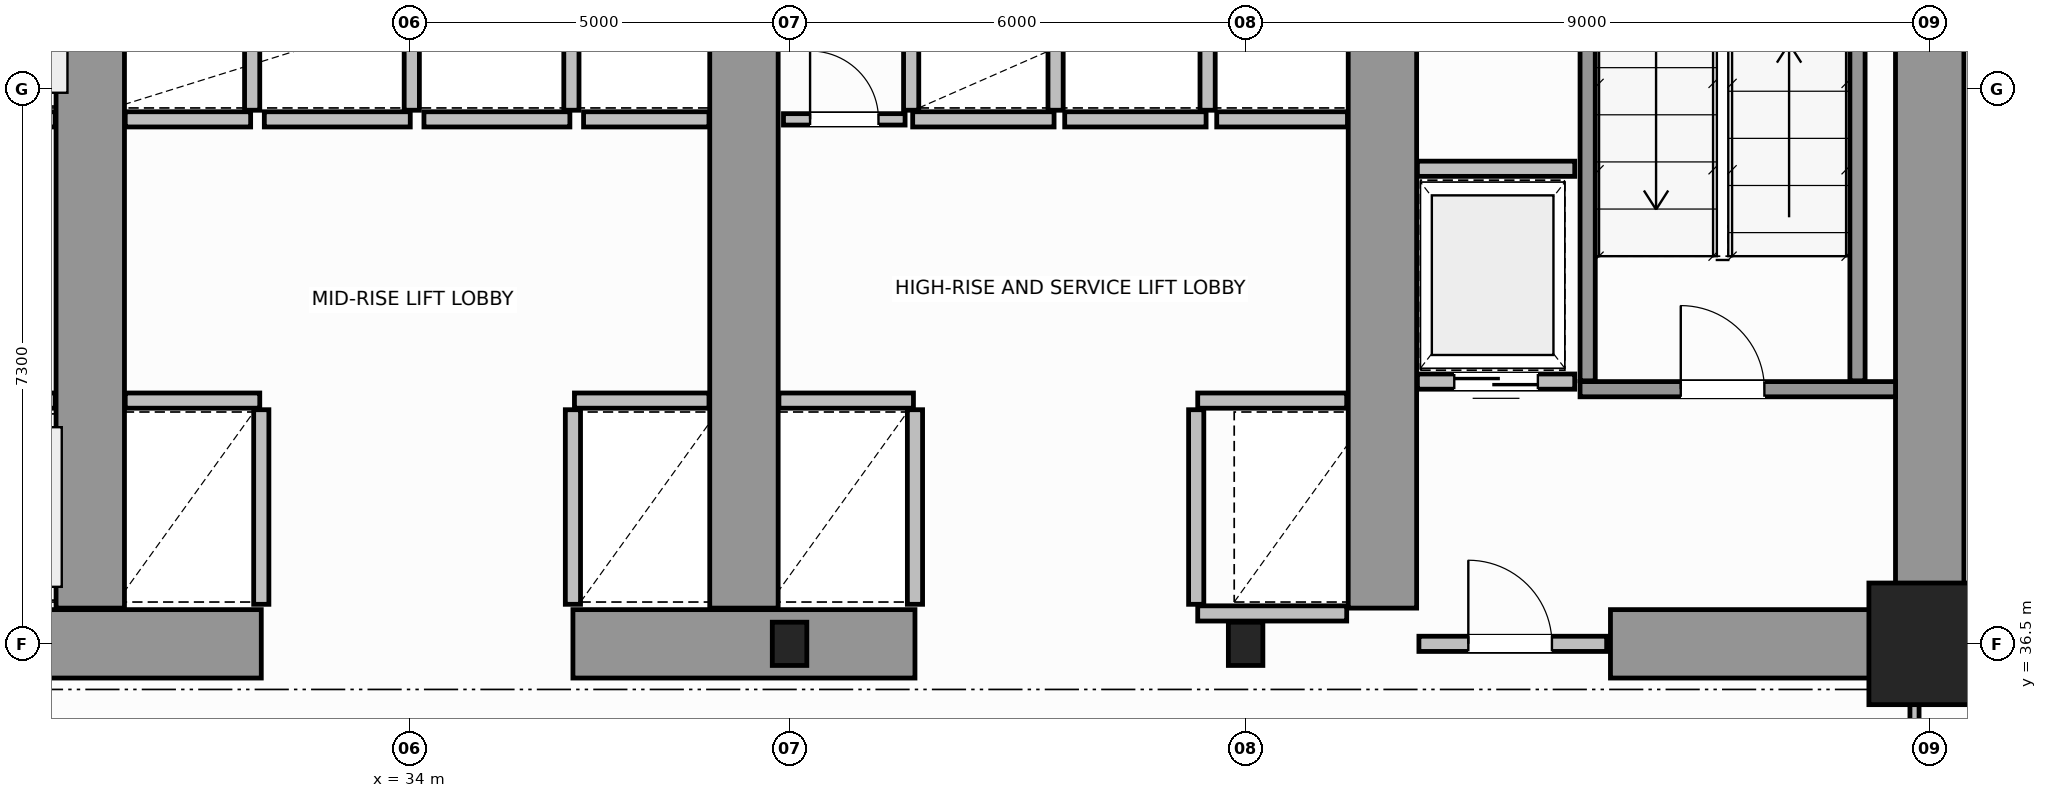
"""IFC4 building model, lengths in metres.
Left out: names, types, materials, properties, quantities, classifications, styles, units other than length and angle.
Written with IfcOpenShell. Run it as: python <this file> out.ifc"""

import sys

from ifc_helpers import new_model, si_unit, direction, frame, frame_2d, origin, origin_2d, place, context, subcontext, project, spatial, rectangle, i_section, extrude, source, transform, mapped, element, fill, save


model = new_model("IFC4")
c1 = context("Model", 3, precision=1e-05, world=origin(), true_north=direction((0.0, 1.0)))
c2 = subcontext(c1, "Body", "Model", "MODEL_VIEW")
j1 = project(units=[si_unit("LENGTHUNIT", "METRE"), si_unit("PLANEANGLEUNIT", "RADIAN")], contexts=[c1])
p1 = place(None, origin())
s1 = spatial("IfcSite", under=j1, at=p1, CompositionType="ELEMENT")
p2 = place(p1, origin())
s2 = spatial("IfcBuilding", under=s1, at=p2, CompositionType="ELEMENT")
p3 = place(p2, frame((0.0, 0.0, 49.2)))
s3 = spatial("IfcBuildingStorey", under=s2, at=p3, CompositionType="ELEMENT", Elevation=49.2)
m1 = source(origin(), c2, "Body", "SweptSolid", [
    extrude(i_section(OverallWidth=0.454, OverallDepth=0.569, WebThickness=0.078, FlangeThickness=0.08, FilletRadius=0.015, at=origin_2d()), origin(), (0.0, 0.0, 1.0), 3.8),
])
for number, where, z_axis, x_axis in (
    (1, (39.0, 36.5, 0.0), (0.0, 0.0, 1.0), (1.0, 0.0, 0.0)),
    (2, (45.0, 36.5, 0.0), (0.0, 0.0, 1.0), (1.0, 0.0, 0.0)),
):
    element("IfcColumn", number, at=place(p3, frame(where, z_axis=z_axis, x_axis=x_axis)), inside=s3, PredefinedType="COLUMN", context=c2, shape_type="MappedRepresentation", body=[
        mapped(m1, transform((0.0, 0.0, 0.0), scale=1.0)),
    ])
m2 = source(origin(), c2, "Body", "SweptSolid", [
    extrude(rectangle(XDim=1.6, YDim=1.6, at=origin_2d()), origin(), (0.0, 0.0, 1.0), 3.8),
])
p4 = place(p3, frame((54.0, 36.5, 0.0), z_axis=(0.0, 0.0, 1.0), x_axis=(1.0, 0.0, 0.0)))
e3 = element("IfcColumn", 3, at=p4, inside=s3, PredefinedType="COLUMN", context=c2, shape_type="MappedRepresentation", body=[
    mapped(m2, transform((0.0, 0.0, 0.0), scale=1.0)),
])
p5 = place(p3, frame((54.0, 36.5, 0.0), z_axis=(0.0, 0.0, 1.0), x_axis=(0.0, 1.0, 0.0)))
e4 = element("IfcWall", 4, at=p5, inside=s3, PredefinedType="SHEAR", context=c2, shape_type="SweptSolid", body=[
    extrude(rectangle(XDim=14.5, YDim=0.9, at=frame_2d((7.25, 0.0))), origin(), (0.0, 0.0, 1.0), 3.8),
])
for number, where, z_axis, x_axis in (
    (5, (27.55, 36.5, 0.0), (0.0, 0.0, 1.0), (1.0, 0.0, 0.0)),
    (6, (36.15, 36.5, 0.0), (0.0, 0.0, 1.0), (1.0, 0.0, 0.0)),
):
    element("IfcWall", number, at=place(p3, frame(where, z_axis=z_axis, x_axis=x_axis)), inside=s3, PredefinedType="SHEAR", context=c2, shape_type="SweptSolid", body=[
        extrude(rectangle(XDim=4.5, YDim=0.9, at=frame_2d((2.25, 0.0))), origin(), (0.0, 0.0, 1.0), 3.8),
    ])
p6 = place(p3, frame((49.8, 36.5, 0.0), z_axis=(0.0, 0.0, 1.0), x_axis=(1.0, 0.0, 0.0)))
e7 = element("IfcWall", 7, at=p6, inside=s3, PredefinedType="SHEAR", context=c2, shape_type="SweptSolid", body=[
    extrude(rectangle(XDim=3.73, YDim=0.9, at=frame_2d((1.865, 0.0))), origin(), (0.0, 0.0, 1.0), 2.38),
])
for number, where, z_axis, x_axis in (
    (8, (29.8, 36.97, 0.0), (0.0, 0.0, 1.0), (0.0, 1.0, 0.0)),
    (9, (38.4, 36.97, 0.0), (0.0, 0.0, 1.0), (0.0, 1.0, 0.0)),
    (10, (46.8, 36.97, 0.0), (0.0, 0.0, 1.0), (0.0, 1.0, 0.0)),
):
    element("IfcWall", number, at=place(p3, frame(where, z_axis=z_axis, x_axis=x_axis)), inside=s3, PredefinedType="SHEAR", context=c2, shape_type="SweptSolid", body=[
        extrude(rectangle(XDim=9.23, YDim=0.9, at=frame_2d((4.615, 0.0))), origin(), (0.0, 0.0, 1.0), 3.8),
    ])
p7 = place(p3, frame((49.4, 39.85, 0.0), z_axis=(0.0, 0.0, 1.0), x_axis=(1.0, 0.0, 0.0)))
e11 = element("IfcWall", 11, at=p7, inside=s3, PredefinedType="SOLIDWALL", context=c2, shape_type="SweptSolid", body=[
    extrude(rectangle(XDim=4.15, YDim=0.2, at=frame_2d((2.075, 0.0))), origin(), (0.0, 0.0, 1.0), 3.8),
])
p8 = place(p7, frame((1.325, 0.0, 0.0)))
e12 = element("IfcOpeningElement", 12, at=p8, cuts=e11, PredefinedType="OPENING", context=c2, shape_type="SweptSolid", body=[
    extrude(rectangle(XDim=1.1, YDim=2.15, at=frame_2d((0.55, 1.075))), frame((0.0, 0.11, 0.0), z_axis=(0.0, -1.0, 0.0), x_axis=(1.0, 0.0, 0.0)), (0.0, 0.0, 1.0), 0.22),
])
for number, where, z_axis, x_axis in (
    (13, (49.5, 39.96, 0.0), (0.0, 0.0, 1.0), (0.0, 1.0, 0.0)),
    (14, (53.05, 39.96, 0.0), (0.0, 0.0, 1.0), (0.0, 1.0, 0.0)),
):
    element("IfcWall", number, at=place(p3, frame(where, z_axis=z_axis, x_axis=x_axis)), inside=s3, PredefinedType="SOLIDWALL", context=c2, shape_type="SweptSolid", body=[
        extrude(rectangle(XDim=9.93, YDim=0.2, at=frame_2d((4.965, 0.0))), origin(), (0.0, 0.0, 1.0), 3.8),
    ])
p9 = place(p3, frame((47.28, 36.5, 0.0), z_axis=(0.0, 0.0, 1.0), x_axis=(1.0, 0.0, 0.0)))
e15 = element("IfcWall", 15, at=p9, inside=s3, PredefinedType="SOLIDWALL", context=c2, shape_type="SweptSolid", body=[
    extrude(rectangle(XDim=2.47, YDim=0.2, at=frame_2d((1.235, 0.0))), origin(), (0.0, 0.0, 1.0), 2.37),
])
p10 = place(p9, frame((0.65, 0.0, 0.0)))
e16 = element("IfcOpeningElement", 16, at=p10, cuts=e15, PredefinedType="OPENING", context=c2, shape_type="SweptSolid", body=[
    extrude(rectangle(XDim=1.1, YDim=2.15, at=frame_2d((0.55, 1.075))), frame((0.0, 0.11, 0.0), z_axis=(0.0, -1.0, 0.0), x_axis=(1.0, 0.0, 0.0)), (0.0, 0.0, 1.0), 0.22),
])
p11 = place(p3, frame((27.57, 39.7, 0.0), z_axis=(0.0, 0.0, 1.0), x_axis=(1.0, 0.0, 0.0)))
e17 = element("IfcWall", 17, at=p11, inside=s3, PredefinedType="SOLIDWALL", context=c2, shape_type="SweptSolid", body=[
    extrude(rectangle(XDim=1.77, YDim=0.2, at=frame_2d((0.885, 0.0))), origin(), (0.0, 0.0, 1.0), 3.58),
])
p12 = place(p11, frame((0.335, 0.0, 0.0)))
e18 = element("IfcOpeningElement", 18, at=p12, cuts=e17, PredefinedType="OPENING", context=c2, shape_type="SweptSolid", body=[
    extrude(rectangle(XDim=1.1, YDim=2.15, at=frame_2d((0.55, 1.075))), frame((0.0, 0.11, 0.0), z_axis=(0.0, -1.0, 0.0), x_axis=(1.0, 0.0, 0.0)), (0.0, 0.0, 1.0), 0.22),
])
p13 = place(p3, frame((27.69, 43.4, 0.0), z_axis=(0.0, 0.0, 1.0), x_axis=(1.0, 0.0, 0.0)))
e19 = element("IfcWall", 19, at=p13, inside=s3, PredefinedType="SOLIDWALL", context=c2, shape_type="SweptSolid", body=[
    extrude(rectangle(XDim=1.65, YDim=0.2, at=frame_2d((0.825, 0.0))), origin(), (0.0, 0.0, 1.0), 3.58),
])
p14 = place(p13, frame((0.275, 0.0, 0.0)))
e20 = element("IfcOpeningElement", 20, at=p14, cuts=e19, PredefinedType="OPENING", context=c2, shape_type="SweptSolid", body=[
    extrude(rectangle(XDim=1.1, YDim=2.15, at=frame_2d((0.55, 1.075))), frame((0.0, 0.11, 0.0), z_axis=(0.0, -1.0, 0.0), x_axis=(1.0, 0.0, 0.0)), (0.0, 0.0, 1.0), 0.22),
])
p15 = place(p3, frame((30.26, 39.7, 0.0), z_axis=(0.0, 0.0, 1.0), x_axis=(1.0, 0.0, 0.0)))
e21 = element("IfcWall", 21, at=p15, inside=s3, PredefinedType="SOLIDWALL", context=c2, shape_type="SweptSolid", body=[
    extrude(rectangle(XDim=1.77, YDim=0.2, at=frame_2d((0.885, 0.0))), origin(), (0.0, 0.0, 1.0), 3.58),
])
p16 = place(p3, frame((32.05, 37.02, 0.0), z_axis=(0.0, 0.0, 1.0), x_axis=(0.0, 1.0, 0.0)))
e22 = element("IfcWall", 22, at=p16, inside=s3, PredefinedType="SOLIDWALL", context=c2, shape_type="SweptSolid", body=[
    extrude(rectangle(XDim=2.56, YDim=0.2, at=frame_2d((1.28, 0.0))), origin(), (0.0, 0.0, 1.0), 3.58),
])
p17 = place(p3, frame((36.17, 39.7, 0.0), z_axis=(0.0, 0.0, 1.0), x_axis=(1.0, 0.0, 0.0)))
e23 = element("IfcWall", 23, at=p17, inside=s3, PredefinedType="SOLIDWALL", context=c2, shape_type="SweptSolid", body=[
    extrude(rectangle(XDim=1.77, YDim=0.2, at=frame_2d((0.885, 0.0))), origin(), (0.0, 0.0, 1.0), 3.58),
])
p18 = place(p3, frame((36.15, 37.02, 0.0), z_axis=(0.0, 0.0, 1.0), x_axis=(0.0, 1.0, 0.0)))
e24 = element("IfcWall", 24, at=p18, inside=s3, PredefinedType="SOLIDWALL", context=c2, shape_type="SweptSolid", body=[
    extrude(rectangle(XDim=2.56, YDim=0.2, at=frame_2d((1.28, 0.0))), origin(), (0.0, 0.0, 1.0), 3.58),
])
p19 = place(p3, frame((30.26, 43.4, 0.0), z_axis=(0.0, 0.0, 1.0), x_axis=(1.0, 0.0, 0.0)))
e25 = element("IfcWall", 25, at=p19, inside=s3, PredefinedType="SOLIDWALL", context=c2, shape_type="SweptSolid", body=[
    extrude(rectangle(XDim=1.65, YDim=0.2, at=frame_2d((0.825, 0.0))), origin(), (0.0, 0.0, 1.0), 3.58),
])
p20 = place(p3, frame((31.93, 43.52, 0.0), z_axis=(0.0, 0.0, 1.0), x_axis=(0.0, 1.0, 0.0)))
e26 = element("IfcWall", 26, at=p20, inside=s3, PredefinedType="SOLIDWALL", context=c2, shape_type="SweptSolid", body=[
    extrude(rectangle(XDim=2.56, YDim=0.2, at=frame_2d((1.28, 0.0))), origin(), (0.0, 0.0, 1.0), 3.58),
])
p21 = place(p3, frame((32.09, 43.4, 0.0), z_axis=(0.0, 0.0, 1.0), x_axis=(1.0, 0.0, 0.0)))
e27 = element("IfcWall", 27, at=p21, inside=s3, PredefinedType="SOLIDWALL", context=c2, shape_type="SweptSolid", body=[
    extrude(rectangle(XDim=1.92, YDim=0.2, at=frame_2d((0.96, 0.0))), origin(), (0.0, 0.0, 1.0), 3.58),
])
p22 = place(p3, frame((34.03, 43.52, 0.0), z_axis=(0.0, 0.0, 1.0), x_axis=(0.0, 1.0, 0.0)))
e28 = element("IfcWall", 28, at=p22, inside=s3, PredefinedType="SOLIDWALL", context=c2, shape_type="SweptSolid", body=[
    extrude(rectangle(XDim=2.56, YDim=0.2, at=frame_2d((1.28, 0.0))), origin(), (0.0, 0.0, 1.0), 3.58),
])
p23 = place(p3, frame((34.19, 43.4, 0.0), z_axis=(0.0, 0.0, 1.0), x_axis=(1.0, 0.0, 0.0)))
e29 = element("IfcWall", 29, at=p23, inside=s3, PredefinedType="SOLIDWALL", context=c2, shape_type="SweptSolid", body=[
    extrude(rectangle(XDim=1.92, YDim=0.2, at=frame_2d((0.96, 0.0))), origin(), (0.0, 0.0, 1.0), 3.58),
])
p24 = place(p3, frame((36.13, 43.52, 0.0), z_axis=(0.0, 0.0, 1.0), x_axis=(0.0, 1.0, 0.0)))
e30 = element("IfcWall", 30, at=p24, inside=s3, PredefinedType="SOLIDWALL", context=c2, shape_type="SweptSolid", body=[
    extrude(rectangle(XDim=2.56, YDim=0.2, at=frame_2d((1.28, 0.0))), origin(), (0.0, 0.0, 1.0), 3.58),
])
p25 = place(p3, frame((36.29, 43.4, 0.0), z_axis=(0.0, 0.0, 1.0), x_axis=(1.0, 0.0, 0.0)))
e31 = element("IfcWall", 31, at=p25, inside=s3, PredefinedType="SOLIDWALL", context=c2, shape_type="SweptSolid", body=[
    extrude(rectangle(XDim=1.65, YDim=0.2, at=frame_2d((0.825, 0.0))), origin(), (0.0, 0.0, 1.0), 3.58),
])
p26 = place(p3, frame((38.86, 39.7, 0.0), z_axis=(0.0, 0.0, 1.0), x_axis=(1.0, 0.0, 0.0)))
e32 = element("IfcWall", 32, at=p26, inside=s3, PredefinedType="SOLIDWALL", context=c2, shape_type="SweptSolid", body=[
    extrude(rectangle(XDim=1.77, YDim=0.2, at=frame_2d((0.885, 0.0))), origin(), (0.0, 0.0, 1.0), 3.58),
])
p27 = place(p3, frame((40.65, 37.02, 0.0), z_axis=(0.0, 0.0, 1.0), x_axis=(0.0, 1.0, 0.0)))
e33 = element("IfcWall", 33, at=p27, inside=s3, PredefinedType="SOLIDWALL", context=c2, shape_type="SweptSolid", body=[
    extrude(rectangle(XDim=2.56, YDim=0.2, at=frame_2d((1.28, 0.0))), origin(), (0.0, 0.0, 1.0), 3.58),
])
p28 = place(p3, frame((44.37, 39.7, 0.0), z_axis=(0.0, 0.0, 1.0), x_axis=(1.0, 0.0, 0.0)))
e34 = element("IfcWall", 34, at=p28, inside=s3, PredefinedType="SOLIDWALL", context=c2, shape_type="SweptSolid", body=[
    extrude(rectangle(XDim=1.96, YDim=0.2, at=frame_2d((0.98, 0.0))), origin(), (0.0, 0.0, 1.0), 3.58),
])
p29 = place(p3, frame((44.37, 36.9, 0.0), z_axis=(0.0, 0.0, 1.0), x_axis=(1.0, 0.0, 0.0)))
e35 = element("IfcWall", 35, at=p29, inside=s3, PredefinedType="SOLIDWALL", context=c2, shape_type="SweptSolid", body=[
    extrude(rectangle(XDim=1.96, YDim=0.2, at=frame_2d((0.98, 0.0))), origin(), (0.0, 0.0, 1.0), 2.37),
])
p30 = place(p3, frame((44.35, 37.02, 0.0), z_axis=(0.0, 0.0, 1.0), x_axis=(0.0, 1.0, 0.0)))
e36 = element("IfcWall", 36, at=p30, inside=s3, PredefinedType="SOLIDWALL", context=c2, shape_type="SweptSolid", body=[
    extrude(rectangle(XDim=2.56, YDim=0.2, at=frame_2d((1.28, 0.0))), origin(), (0.0, 0.0, 1.0), 3.58),
])
p31 = place(p3, frame((40.62, 43.4, 0.0), z_axis=(0.0, 0.0, 1.0), x_axis=(1.0, 0.0, 0.0)))
e37 = element("IfcWall", 37, at=p31, inside=s3, PredefinedType="SOLIDWALL", context=c2, shape_type="SweptSolid", body=[
    extrude(rectangle(XDim=1.86, YDim=0.2, at=frame_2d((0.93, 0.0))), origin(), (0.0, 0.0, 1.0), 3.58),
])
for number, where, z_axis, x_axis in (
    (38, (40.6, 43.52, 0.0), (0.0, 0.0, 1.0), (0.0, 1.0, 0.0)),
    (39, (42.5, 43.52, 0.0), (0.0, 0.0, 1.0), (0.0, 1.0, 0.0)),
):
    element("IfcWall", number, at=place(p3, frame(where, z_axis=z_axis, x_axis=x_axis)), inside=s3, PredefinedType="SOLIDWALL", context=c2, shape_type="SweptSolid", body=[
        extrude(rectangle(XDim=2.56, YDim=0.2, at=frame_2d((1.28, 0.0))), origin(), (0.0, 0.0, 1.0), 3.58),
    ])
p32 = place(p3, frame((42.62, 43.4, 0.0), z_axis=(0.0, 0.0, 1.0), x_axis=(1.0, 0.0, 0.0)))
e40 = element("IfcWall", 40, at=p32, inside=s3, PredefinedType="SOLIDWALL", context=c2, shape_type="SweptSolid", body=[
    extrude(rectangle(XDim=1.86, YDim=0.2, at=frame_2d((0.93, 0.0))), origin(), (0.0, 0.0, 1.0), 3.58),
])
p33 = place(p3, frame((44.5, 43.52, 0.0), z_axis=(0.0, 0.0, 1.0), x_axis=(0.0, 1.0, 0.0)))
e41 = element("IfcWall", 41, at=p33, inside=s3, PredefinedType="SOLIDWALL", context=c2, shape_type="SweptSolid", body=[
    extrude(rectangle(XDim=2.56, YDim=0.2, at=frame_2d((1.28, 0.0))), origin(), (0.0, 0.0, 1.0), 3.58),
])
p34 = place(p3, frame((44.62, 43.4, 0.0), z_axis=(0.0, 0.0, 1.0), x_axis=(1.0, 0.0, 0.0)))
e42 = element("IfcWall", 42, at=p34, inside=s3, PredefinedType="SOLIDWALL", context=c2, shape_type="SweptSolid", body=[
    extrude(rectangle(XDim=1.72, YDim=0.2, at=frame_2d((0.86, 0.0))), origin(), (0.0, 0.0, 1.0), 3.58),
])
p35 = place(p3, frame((47.26, 39.95, 0.0), z_axis=(0.0, 0.0, 1.0), x_axis=(1.0, 0.0, 0.0)))
e43 = element("IfcWall", 43, at=p35, inside=s3, PredefinedType="SOLIDWALL", context=c2, shape_type="SweptSolid", body=[
    extrude(rectangle(XDim=2.07, YDim=0.2, at=frame_2d((1.035, 0.0))), origin(), (0.0, 0.0, 1.0), 3.58),
])
p36 = place(p35, frame((0.485, 0.0, 0.0)))
e44 = element("IfcOpeningElement", 44, at=p36, cuts=e43, PredefinedType="OPENING", context=c2, shape_type="SweptSolid", body=[
    extrude(rectangle(XDim=1.1, YDim=2.15, at=frame_2d((0.55, 1.075))), frame((0.0, 0.11, 0.0), z_axis=(0.0, -1.0, 0.0), x_axis=(1.0, 0.0, 0.0)), (0.0, 0.0, 1.0), 0.22),
])
p37 = place(p3, frame((47.26, 42.75, 0.0), z_axis=(0.0, 0.0, 1.0), x_axis=(1.0, 0.0, 0.0)))
e45 = element("IfcWall", 45, at=p37, inside=s3, PredefinedType="SOLIDWALL", context=c2, shape_type="SweptSolid", body=[
    extrude(rectangle(XDim=2.07, YDim=0.2, at=frame_2d((1.035, 0.0))), origin(), (0.0, 0.0, 1.0), 3.58),
])
p38 = place(p3, frame((38.92, 43.4, 0.0), z_axis=(0.0, 0.0, 1.0), x_axis=(1.0, 0.0, 0.0)))
e46 = element("IfcWall", 46, at=p38, inside=s3, PredefinedType="PARTITIONING", context=c2, shape_type="SweptSolid", body=[
    extrude(rectangle(XDim=1.6, YDim=0.15, at=frame_2d((0.8, 0.0))), origin(), (0.0, 0.0, 1.0), 3.58),
])
p39 = place(p38, frame((0.35, 0.0, 0.0)))
e47 = element("IfcOpeningElement", 47, at=p39, cuts=e46, PredefinedType="OPENING", context=c2, shape_type="SweptSolid", body=[
    extrude(rectangle(XDim=0.9, YDim=2.1, at=frame_2d((0.45, 1.05))), frame((0.0, 0.085, 0.0), z_axis=(0.0, -1.0, 0.0), x_axis=(1.0, 0.0, 0.0)), (0.0, 0.0, 1.0), 0.17),
])
p40 = place(p3, frame((53.8, 34.16, 0.0), z_axis=(0.0, 0.0, 1.0), x_axis=(0.0, 1.0, 0.0)))
e48 = element("IfcWall", 48, at=p40, inside=s3, PredefinedType="PARTITIONING", context=c2, shape_type="SweptSolid", body=[
    extrude(rectangle(XDim=2.28, YDim=0.12, at=frame_2d((1.14, 0.0))), origin(), (0.0, 0.0, 1.0), 3.58),
])
p41 = place(p40, frame((0.3, 0.0, 0.0)))
e49 = element("IfcOpeningElement", 49, at=p41, cuts=e48, PredefinedType="OPENING", context=c2, shape_type="SweptSolid", body=[
    extrude(rectangle(XDim=0.9, YDim=2.15, at=frame_2d((0.45, 1.075))), frame((0.0, 0.07, 0.0), z_axis=(0.0, -1.0, 0.0), x_axis=(1.0, 0.0, 0.0)), (0.0, 0.0, 1.0), 0.14),
])
m3 = source(origin(), c2, "Body", "SweptSolid", [
    extrude(rectangle(XDim=1.1, YDim=2.15, at=frame_2d((0.55, 1.075))), frame((0.0, 0.025, 0.0), z_axis=(0.0, -1.0, 0.0), x_axis=(1.0, 0.0, 0.0)), (0.0, 0.0, 1.0), 0.05),
])
p42 = place(p8, origin())
e50 = element("IfcDoor", 50, at=p42, inside=s3, OperationType="SINGLE_SWING_RIGHT", PredefinedType="DOOR", context=c2, shape_type="MappedRepresentation", body=[
    mapped(m3, transform((0.0, 0.0, 0.0), scale=1.0)),
])
fill(e12, e50)
p43 = place(p10, origin())
e51 = element("IfcDoor", 51, at=p43, inside=s3, OperationType="SINGLE_SWING_LEFT", PredefinedType="DOOR", context=c2, shape_type="MappedRepresentation", body=[
    mapped(m3, transform((0.0, 0.0, 0.0), scale=1.0)),
])
fill(e16, e51)
p44 = place(p36, origin())
e52 = element("IfcDoor", 52, at=p44, inside=s3, OperationType="DOUBLE_DOOR_SLIDING", PredefinedType="DOOR", context=c2, shape_type="MappedRepresentation", body=[
    mapped(m3, transform((0.0, 0.0, 0.0), scale=1.0)),
])
fill(e44, e52)
m4 = source(origin(), c2, "Body", "SweptSolid", [
    extrude(rectangle(XDim=0.9, YDim=2.1, at=frame_2d((0.45, 1.05))), frame((0.0, 0.025, 0.0), z_axis=(0.0, -1.0, 0.0), x_axis=(1.0, 0.0, 0.0)), (0.0, 0.0, 1.0), 0.05),
])
p45 = place(p39, origin())
e53 = element("IfcDoor", 53, at=p45, inside=s3, OperationType="SINGLE_SWING_LEFT", PredefinedType="DOOR", context=c2, shape_type="MappedRepresentation", body=[
    mapped(m4, transform((0.0, 0.0, 0.0), scale=1.0)),
])
fill(e47, e53)
save(model, sys.argv[1])
